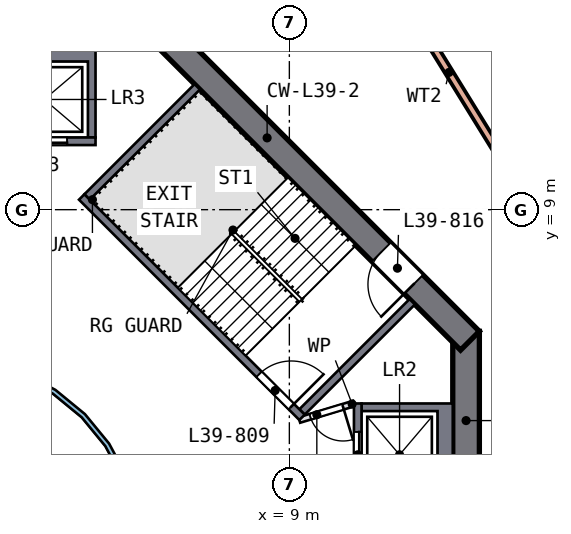
"""IFC4 building model, lengths in metres.
Left out: names, types, materials, properties, quantities, classifications, styles, units other than length and angle.
Written with IfcOpenShell. Run it as: python <this file> out.ifc"""

import sys

from ifc_helpers import new_model, si_unit, direction, frame, frame_2d, origin, place, context, subcontext, project, spatial, polyline, rectangle, outline, extrude, element, fill, save


model = new_model("IFC4")
c1 = context("Model", 3, precision=1e-05, world=origin(), true_north=direction((0.0, 1.0)))
c2 = subcontext(c1, "Body", "Model", "MODEL_VIEW")
j1 = project(units=[si_unit("LENGTHUNIT", "METRE"), si_unit("PLANEANGLEUNIT", "RADIAN")], contexts=[c1])
p1 = place(None, origin())
s1 = spatial("IfcSite", under=j1, at=p1, CompositionType="ELEMENT")
p2 = place(p1, origin())
s2 = spatial("IfcBuilding", under=s1, at=p2, CompositionType="ELEMENT")
p3 = place(p2, frame((0.0, 0.0, 162.0)))
s3 = spatial("IfcBuildingStorey", under=s2, at=p3, CompositionType="ELEMENT", Elevation=162.0)
p4 = place(p3, frame((13.65, -5.799, 0.0), z_axis=(0.0, 0.0, 1.0), x_axis=(0.0, 1.0, 0.0)))
e1 = element("IfcWall", 1, at=p4, inside=s3, PredefinedType="SHEAR", context=c2, shape_type="SweptSolid", body=[
    extrude(rectangle(XDim=11.598, YDim=0.7, at=frame_2d((5.799, 0.0))), origin(), (0.0, 0.0, 1.0), 3.5),
])
p5 = place(p4, frame((4.899, 0.0, 0.0)))
e2 = element("IfcOpeningElement", 2, at=p5, cuts=e1, PredefinedType="OPENING", context=c2, shape_type="SweptSolid", body=[
    extrude(rectangle(XDim=1.8, YDim=2.1, at=frame_2d((0.9, 1.05))), frame((0.0, 0.36, 0.0), z_axis=(0.0, -1.0, 0.0), x_axis=(1.0, 0.0, 0.0)), (0.0, 0.0, 1.0), 0.72),
])
p6 = place(p3, frame((13.752, 5.552, 0.0), z_axis=(0.0, 0.0, 1.0), x_axis=(-0.707106781, 0.707106781, 0.0)))
e3 = element("IfcWall", 3, at=p6, inside=s3, PredefinedType="SHEAR", context=c2, shape_type="SweptSolid", body=[
    extrude(rectangle(XDim=11.598, YDim=0.7, at=frame_2d((5.799, 0.0))), origin(), (0.0, 0.0, 1.0), 3.5),
])
p7 = place(p6, frame((2.099, 0.0, 0.0)))
e4 = element("IfcOpeningElement", 4, at=p7, cuts=e3, PredefinedType="OPENING", context=c2, shape_type="SweptSolid", body=[
    extrude(rectangle(XDim=1.2, YDim=2.1, at=frame_2d((0.6, 1.05))), frame((0.0, 0.36, 0.0), z_axis=(0.0, -1.0, 0.0), x_axis=(1.0, 0.0, 0.0)), (0.0, 0.0, 1.0), 0.72),
])
p8 = place(p3, frame((11.784, 14.91, 0.0), z_axis=(0.0, 0.0, 1.0), x_axis=(0.525179384, -0.850991548, 0.0)))
e5 = element("IfcWall", 5, at=p8, inside=s3, PredefinedType="SOLIDWALL", context=c2, shape_type="SweptSolid", body=[
    extrude(rectangle(XDim=13.0, YDim=0.2, at=frame_2d((6.5, 0.0))), origin(), (0.0, 0.0, 1.0), 3.19),
])
p9 = place(p8, frame((5.6, 0.0, 0.0)))
e6 = element("IfcOpeningElement", 6, at=p9, cuts=e5, PredefinedType="OPENING", context=c2, shape_type="SweptSolid", body=[
    extrude(rectangle(XDim=1.8, YDim=2.4, at=frame_2d((0.9, 1.2))), frame((0.0, 0.11, 0.0), z_axis=(0.0, -1.0, 0.0), x_axis=(1.0, 0.0, 0.0)), (0.0, 0.0, 1.0), 0.22),
])
p10 = place(p3, origin())
e7 = element("IfcWall", 7, at=p10, inside=s3, PredefinedType="SOLIDWALL", context=c2, shape_type="SweptSolid", body=[
    extrude(outline(polyline([(13.3, 3.9), (13.3, 1.2), (10.9, 1.2), (10.9, 1.4), (12.9, 1.4), (12.9, 3.7), (10.9, 3.7), (10.9, 3.9), (13.3, 3.9)])), origin(), (0.0, 0.0, 1.0), 3.19),
])
p11 = place(p3, frame((10.8, 1.2, 0.0), z_axis=(0.0, 0.0, 1.0), x_axis=(0.0, 1.0, 0.0)))
e8 = element("IfcWall", 8, at=p11, inside=s3, PredefinedType="SOLIDWALL", context=c2, shape_type="SweptSolid", body=[
    extrude(rectangle(XDim=2.7, YDim=0.2, at=frame_2d((1.35, 0.0))), origin(), (0.0, 0.0, 1.0), 3.19),
])
p12 = place(p11, frame((0.75, 0.0, 0.0)))
e9 = element("IfcOpeningElement", 9, at=p12, cuts=e8, PredefinedType="OPENING", context=c2, shape_type="SweptSolid", body=[
    extrude(rectangle(XDim=1.2, YDim=2.1, at=frame_2d((0.6, 1.05))), frame((0.0, 0.11, 0.0), z_axis=(0.0, -1.0, 0.0), x_axis=(1.0, 0.0, 0.0)), (0.0, 0.0, 1.0), 0.22),
])
p13 = place(p3, origin())
e10 = element("IfcWall", 10, at=p13, inside=s3, PredefinedType="SOLIDWALL", context=c2, shape_type="SweptSolid", body=[
    extrude(outline(polyline([(3.9, 13.3), (3.9, 10.9), (3.7, 10.9), (3.7, 12.9), (1.4, 12.9), (1.4, 10.9), (1.2, 10.9), (1.2, 13.3), (3.9, 13.3)])), origin(), (0.0, 0.0, 1.0), 3.19),
])
p14 = place(p3, frame((1.2, 10.8, 0.0), z_axis=(0.0, 0.0, 1.0), x_axis=(1.0, 0.0, 0.0)))
e11 = element("IfcWall", 11, at=p14, inside=s3, PredefinedType="SOLIDWALL", context=c2, shape_type="SweptSolid", body=[
    extrude(rectangle(XDim=2.7, YDim=0.2, at=frame_2d((1.35, 0.0))), origin(), (0.0, 0.0, 1.0), 3.19),
])
p15 = place(p14, frame((0.75, 0.0, 0.0)))
e12 = element("IfcOpeningElement", 12, at=p15, cuts=e11, PredefinedType="OPENING", context=c2, shape_type="SweptSolid", body=[
    extrude(rectangle(XDim=1.2, YDim=2.1, at=frame_2d((0.6, 1.05))), frame((0.0, 0.11, 0.0), z_axis=(0.0, -1.0, 0.0), x_axis=(1.0, 0.0, 0.0)), (0.0, 0.0, 1.0), 0.22),
])
p16 = place(p3, frame((3.535, 9.334, 0.0), z_axis=(0.0, 0.0, 1.0), x_axis=(0.707106781, -0.707106781, 0.0)))
e13 = element("IfcWall", 13, at=p16, inside=s3, PredefinedType="SOLIDWALL", context=c2, shape_type="SweptSolid", body=[
    extrude(rectangle(XDim=8.2, YDim=0.2, at=frame_2d((4.1, 0.0))), origin(), (0.0, 0.0, 1.0), 3.19),
])
p17 = place(p16, frame((6.6, 0.0, 0.0)))
e14 = element("IfcOpeningElement", 14, at=p17, cuts=e13, PredefinedType="OPENING", context=c2, shape_type="SweptSolid", body=[
    extrude(rectangle(XDim=1.2, YDim=2.1, at=frame_2d((0.6, 1.05))), frame((0.0, 0.11, 0.0), z_axis=(0.0, -1.0, 0.0), x_axis=(1.0, 0.0, 0.0)), (0.0, 0.0, 1.0), 0.22),
])
for number, where, z_axis, x_axis in (
    (15, (9.334, 3.677, 0.0), (0.0, 0.0, 1.0), (0.707, 0.707, 0.0)),
    (16, (3.677, 9.334, 0.0), (0.0, 0.0, 1.0), (0.707, 0.707, 0.0)),
):
    element("IfcWall", number, at=place(p3, frame(where, z_axis=z_axis, x_axis=x_axis)), inside=s3, PredefinedType="SOLIDWALL", context=c2, shape_type="SweptSolid", body=[
        extrude(rectangle(XDim=4.1, YDim=0.2, at=frame_2d((2.05, 0.0))), origin(), (0.0, 0.0, 1.0), 3.19),
    ])
p18 = place(p3, frame((10.7, 3.9, 0.0), z_axis=(0.0, 0.0, 1.0), x_axis=(-0.957084567, -0.289808785, 0.0)))
e17 = element("IfcWall", 17, at=p18, inside=s3, PredefinedType="PARTITIONING", context=c2, shape_type="SweptSolid", body=[
    extrude(rectangle(XDim=1.501, YDim=0.15, at=frame_2d((0.75, 0.0))), origin(), (0.0, 0.0, 1.0), 3.19),
])
p19 = place(p18, frame((0.301, 0.0, 0.0)))
e18 = element("IfcOpeningElement", 18, at=p19, cuts=e17, PredefinedType="OPENING", context=c2, shape_type="SweptSolid", body=[
    extrude(rectangle(XDim=0.9, YDim=2.1, at=frame_2d((0.45, 1.05))), frame((0.0, 0.085, 0.0), z_axis=(0.0, -1.0, 0.0), x_axis=(1.0, 0.0, 0.0)), (0.0, 0.0, 1.0), 0.17),
])
p20 = place(p3, origin())
e19 = element("IfcWall", 19, at=p20, inside=s3, PredefinedType="SOLIDWALL", context=c2, shape_type="SweptSolid", body=[
    extrude(outline(polyline([(5.021, -0.999), (4.73, -1.959), (4.257, -2.844), (3.62, -3.62), (2.844, -4.257), (1.959, -4.73), (0.999, -5.021), (0.0, -5.12), (-0.999, -5.021), (-1.959, -4.73), (-2.844, -4.257), (-3.62, -3.62), (-4.257, -2.844), (-4.73, -1.959), (-5.021, -0.999), (-5.12, 0.0), (-5.021, 0.999), (-4.73, 1.959), (-4.257, 2.844), (-3.62, 3.62), (-2.844, 4.257), (-1.959, 4.73), (-0.999, 5.021), (0.0, 5.12), (0.999, 5.021), (1.959, 4.73), (2.844, 4.257), (3.62, 3.62), (4.257, 2.844), (4.73, 1.959), (5.021, 0.999), (5.12, 0.0), (5.021, -0.999)]), holes=[polyline([(4.904, 0.976), (4.619, 1.913), (4.157, 2.778), (3.535, 3.535), (2.778, 4.157), (1.913, 4.619), (0.976, 4.904), (0.0, 5.0), (-0.976, 4.904), (-1.913, 4.619), (-2.778, 4.157), (-3.535, 3.535), (-4.157, 2.778), (-4.619, 1.913), (-4.904, 0.976), (-5.0, 0.0), (-4.904, -0.976), (-4.619, -1.913), (-4.157, -2.778), (-3.535, -3.535), (-2.778, -4.157), (-1.913, -4.619), (-0.976, -4.904), (0.0, -5.0), (0.976, -4.904), (1.913, -4.619), (2.778, -4.157), (3.535, -3.535), (4.157, -2.778), (4.619, -1.913), (4.904, -0.976), (5.0, 0.0), (4.904, 0.976)])]), origin(), (0.0, 0.0, 1.0), 3.19),
])
p21 = place(p12, origin())
e20 = element("IfcDoor", 20, at=p21, inside=s3, OperationType="DOUBLE_DOOR_SLIDING", PredefinedType="DOOR", context=c2, shape_type="SweptSolid", body=[
    extrude(rectangle(XDim=1.2, YDim=2.1, at=frame_2d((0.6, 1.05))), frame((0.0, 0.025, 0.0), z_axis=(0.0, -1.0, 0.0), x_axis=(1.0, 0.0, 0.0)), (0.0, 0.0, 1.0), 0.05),
])
fill(e9, e20)
p22 = place(p15, origin())
e21 = element("IfcDoor", 21, at=p22, inside=s3, OperationType="DOUBLE_DOOR_SLIDING", PredefinedType="DOOR", context=c2, shape_type="SweptSolid", body=[
    extrude(rectangle(XDim=1.2, YDim=2.1, at=frame_2d((0.6, 1.05))), frame((0.0, 0.025, 0.0), z_axis=(0.0, -1.0, 0.0), x_axis=(1.0, 0.0, 0.0)), (0.0, 0.0, 1.0), 0.05),
])
fill(e12, e21)
p23 = place(p17, origin())
e22 = element("IfcDoor", 22, at=p23, inside=s3, OperationType="SINGLE_SWING_RIGHT", PredefinedType="DOOR", context=c2, shape_type="SweptSolid", body=[
    extrude(rectangle(XDim=1.2, YDim=2.1, at=frame_2d((0.6, 1.05))), frame((0.0, 0.025, 0.0), z_axis=(0.0, -1.0, 0.0), x_axis=(1.0, 0.0, 0.0)), (0.0, 0.0, 1.0), 0.05),
])
fill(e14, e22)
p24 = place(p7, origin())
e23 = element("IfcDoor", 23, at=p24, inside=s3, OperationType="SINGLE_SWING_LEFT", PredefinedType="DOOR", context=c2, shape_type="SweptSolid", body=[
    extrude(rectangle(XDim=1.2, YDim=2.1, at=frame_2d((0.6, 1.05))), frame((0.0, 0.025, 0.0), z_axis=(0.0, -1.0, 0.0), x_axis=(1.0, 0.0, 0.0)), (0.0, 0.0, 1.0), 0.05),
])
fill(e4, e23)
p25 = place(p19, origin())
e24 = element("IfcDoor", 24, at=p25, inside=s3, OperationType="SINGLE_SWING_LEFT", PredefinedType="DOOR", context=c2, shape_type="SweptSolid", body=[
    extrude(rectangle(XDim=0.9, YDim=2.1, at=frame_2d((0.45, 1.05))), frame((0.0, 0.025, 0.0), z_axis=(0.0, -1.0, 0.0), x_axis=(1.0, 0.0, 0.0)), (0.0, 0.0, 1.0), 0.05),
])
fill(e18, e24)
save(model, sys.argv[1])
